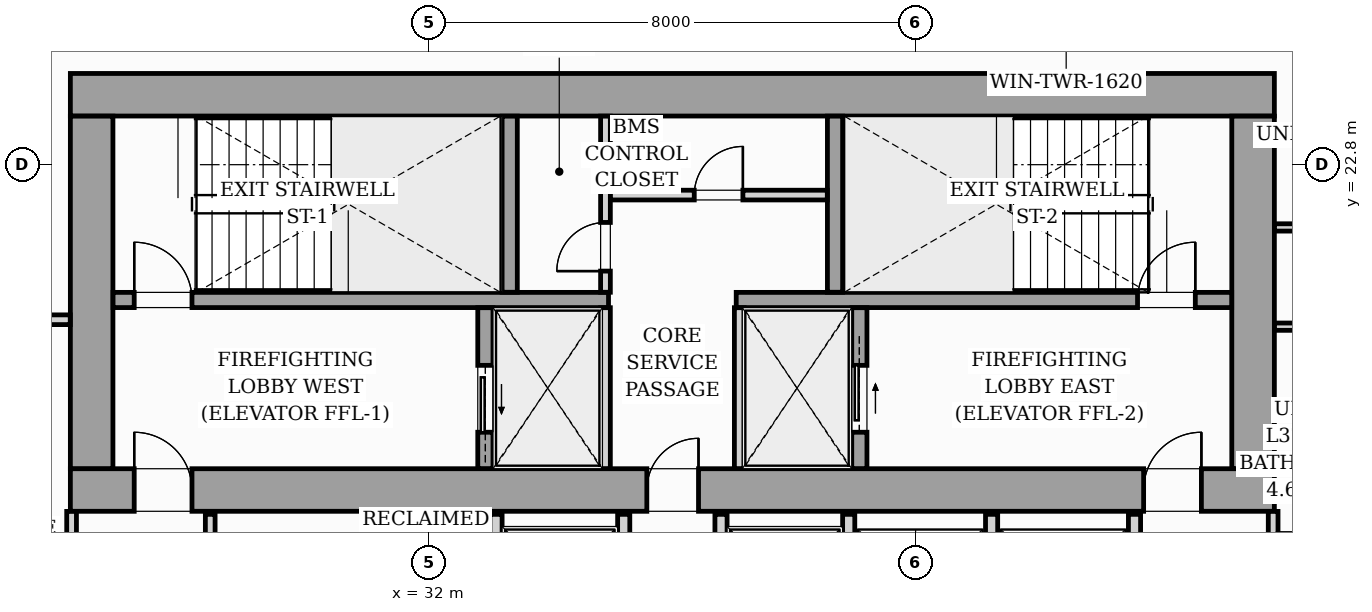
"""IFC4 building model, lengths in metres.
Left out: names, types, materials, properties, quantities, classifications, styles, units other than length and angle.
Written with IfcOpenShell. Run it as: python <this file> out.ifc"""

import sys

from ifc_helpers import new_model, si_unit, direction, frame, frame_2d, origin, origin_2d, place, context, subcontext, project, spatial, rectangle, i_section, extrude, source, transform, mapped, element, fill, save


model = new_model("IFC4")
c1 = context("Model", 3, precision=1e-05, world=origin(), true_north=direction((0.0, 1.0)))
c2 = subcontext(c1, "Body", "Model", "MODEL_VIEW")
j1 = project(units=[si_unit("LENGTHUNIT", "METRE"), si_unit("PLANEANGLEUNIT", "RADIAN")], contexts=[c1])
p1 = place(None, origin())
s1 = spatial("IfcSite", under=j1, at=p1, CompositionType="ELEMENT")
p2 = place(p1, origin())
s2 = spatial("IfcBuilding", under=s1, at=p2, CompositionType="ELEMENT")
p3 = place(p2, frame((0.0, 0.0, 131.0)))
s3 = spatial("IfcBuildingStorey", under=s2, at=p3, CompositionType="ELEMENT", Elevation=131.0)
m1 = source(origin(), c2, "Body", "SweptSolid", [
    extrude(i_section(OverallWidth=0.421, OverallDepth=0.465, WebThickness=0.045, FlangeThickness=0.073, FilletRadius=0.018, at=origin_2d()), origin(), (0.0, 0.0, 1.0), 3.196),
])
for number, where, z_axis, x_axis in (
    (1, (26.4, 17.4, 0.002), (0.0, 0.0, 1.0), (1.0, 0.0, 0.0)),
    (2, (33.12, 17.4, 0.002), (0.0, 0.0, 1.0), (1.0, 0.0, 0.0)),
    (3, (38.88, 17.4, 0.002), (0.0, 0.0, 1.0), (1.0, 0.0, 0.0)),
    (4, (45.6, 17.4, 0.002), (0.0, 0.0, 1.0), (1.0, 0.0, 0.0)),
    (5, (26.4, 24.0, 0.002), (0.0, 0.0, 1.0), (1.0, 0.0, 0.0)),
    (6, (33.12, 24.0, 0.002), (0.0, 0.0, 1.0), (1.0, 0.0, 0.0)),
    (7, (38.88, 24.0, 0.002), (0.0, 0.0, 1.0), (1.0, 0.0, 0.0)),
    (8, (45.6, 24.0, 0.002), (0.0, 0.0, 1.0), (1.0, 0.0, 0.0)),
):
    element("IfcColumn", number, at=place(p3, frame(where, z_axis=z_axis, x_axis=x_axis)), inside=s3, PredefinedType="PILASTER", context=c2, shape_type="MappedRepresentation", body=[
        mapped(m1, transform((0.0, 0.0, 0.0), scale=1.0)),
    ])
p4 = place(p3, frame((40.983, 25.727, 0.0), z_axis=(0.0, 0.0, 1.0), x_axis=(0.995395844771, -0.095849424686, 0.0)))
e9 = element("IfcWall", 9, at=p4, inside=s3, PredefinedType="STANDARD", context=c2, shape_type="SweptSolid", body=[
    extrude(rectangle(XDim=17.01, YDim=0.26, at=frame_2d((8.505, 0.0))), origin(), (0.0, 0.0, 1.0), 2.94),
])
p5 = place(p4, frame((9.18, 0.0, 0.0)))
e10 = element("IfcOpeningElement", 10, at=p5, cuts=e9, PredefinedType="OPENING", context=c2, shape_type="SweptSolid", body=[
    extrude(rectangle(XDim=1.8, YDim=2.06, at=frame_2d((0.9, 1.03))), frame((0.0, 0.14, 0.0), z_axis=(0.0, -1.0, 0.0), x_axis=(1.0, 0.0, 0.0)), (0.0, 0.0, 1.0), 0.28),
])
p6 = place(p4, frame((0.7, 0.0, 0.65)))
e11 = element("IfcOpeningElement", 11, at=p6, cuts=e9, PredefinedType="OPENING", context=c2, shape_type="SweptSolid", body=[
    extrude(rectangle(XDim=1.6, YDim=1.5, at=frame_2d((0.8, 0.75))), frame((0.0, 0.14, 0.0), z_axis=(0.0, -1.0, 0.0), x_axis=(1.0, 0.0, 0.0)), (0.0, 0.0, 1.0), 0.28),
])
p7 = place(p3, frame((26.1, 17.45, 0.0), z_axis=(0.0, 0.0, 1.0), x_axis=(1.0, 0.0, 0.0)))
e12 = element("IfcWall", 12, at=p7, inside=s3, PredefinedType="SHEAR", context=c2, shape_type="SweptSolid", body=[
    extrude(rectangle(XDim=19.8, YDim=0.7, at=frame_2d((9.9, 0.0))), origin(), (0.0, 0.0, 1.0), 3.2),
])
p8 = place(p7, frame((1.05, 0.0, 0.0)))
e13 = element("IfcOpeningElement", 13, at=p8, cuts=e12, PredefinedType="OPENING", context=c2, shape_type="SweptSolid", body=[
    extrude(rectangle(XDim=0.95, YDim=2.06, at=frame_2d((0.475, 1.03))), frame((0.0, 0.36, 0.0), z_axis=(0.0, -1.0, 0.0), x_axis=(1.0, 0.0, 0.0)), (0.0, 0.0, 1.0), 0.72),
])
p9 = place(p7, frame((9.48, 0.0, 0.0)))
e14 = element("IfcOpeningElement", 14, at=p9, cuts=e12, PredefinedType="OPENING", context=c2, shape_type="SweptSolid", body=[
    extrude(rectangle(XDim=0.85, YDim=2.0, at=frame_2d((0.425, 1.0))), frame((0.0, 0.36, 0.0), z_axis=(0.0, -1.0, 0.0), x_axis=(1.0, 0.0, 0.0)), (0.0, 0.0, 1.0), 0.72),
])
p10 = place(p7, frame((17.65, 0.0, 0.0)))
e15 = element("IfcOpeningElement", 15, at=p10, cuts=e12, PredefinedType="OPENING", context=c2, shape_type="SweptSolid", body=[
    extrude(rectangle(XDim=0.95, YDim=2.06, at=frame_2d((0.475, 1.03))), frame((0.0, 0.36, 0.0), z_axis=(0.0, -1.0, 0.0), x_axis=(1.0, 0.0, 0.0)), (0.0, 0.0, 1.0), 0.72),
])
p11 = place(p3, frame((26.1, 23.95, 0.0), z_axis=(0.0, 0.0, 1.0), x_axis=(1.0, 0.0, 0.0)))
e16 = element("IfcWall", 16, at=p11, inside=s3, PredefinedType="SHEAR", context=c2, shape_type="SweptSolid", body=[
    extrude(rectangle(XDim=19.8, YDim=0.7, at=frame_2d((9.9, 0.0))), origin(), (0.0, 0.0, 1.0), 3.2),
])
for number, where, z_axis, x_axis in (
    (17, (26.45, 17.802, 0.0), (0.0, 0.0, 1.0), (0.0, 1.0, 0.0)),
    (18, (45.55, 17.802, 0.0), (0.0, 0.0, 1.0), (0.0, 1.0, 0.0)),
):
    element("IfcWall", number, at=place(p3, frame(where, z_axis=z_axis, x_axis=x_axis)), inside=s3, PredefinedType="SHEAR", context=c2, shape_type="SweptSolid", body=[
        extrude(rectangle(XDim=5.796, YDim=0.7, at=frame_2d((2.898, 0.0))), origin(), (0.0, 0.0, 1.0), 3.2),
    ])
p12 = place(p3, frame((26.802, 20.575, 0.0), z_axis=(0.0, 0.0, 1.0), x_axis=(1.0, 0.0, 0.0)))
e19 = element("IfcWall", 19, at=p12, inside=s3, PredefinedType="SOLIDWALL", context=c2, shape_type="SweptSolid", body=[
    extrude(rectangle(XDim=8.148, YDim=0.25, at=frame_2d((4.074, 0.0))), origin(), (0.0, 0.0, 1.0), 3.2),
])
p13 = place(p12, frame((0.348, 0.0, 0.0)))
e20 = element("IfcOpeningElement", 20, at=p13, cuts=e19, PredefinedType="OPENING", context=c2, shape_type="SweptSolid", body=[
    extrude(rectangle(XDim=0.95, YDim=2.06, at=frame_2d((0.475, 1.03))), frame((0.0, 0.135, 0.0), z_axis=(0.0, -1.0, 0.0), x_axis=(1.0, 0.0, 0.0)), (0.0, 0.0, 1.0), 0.27),
])
p14 = place(p3, frame((37.05, 20.575, 0.0), z_axis=(0.0, 0.0, 1.0), x_axis=(1.0, 0.0, 0.0)))
e21 = element("IfcWall", 21, at=p14, inside=s3, PredefinedType="SOLIDWALL", context=c2, shape_type="SweptSolid", body=[
    extrude(rectangle(XDim=8.148, YDim=0.25, at=frame_2d((4.074, 0.0))), origin(), (0.0, 0.0, 1.0), 3.2),
])
p15 = place(p14, frame((6.6, 0.0, 0.0)))
e22 = element("IfcOpeningElement", 22, at=p15, cuts=e21, PredefinedType="OPENING", context=c2, shape_type="SweptSolid", body=[
    extrude(rectangle(XDim=0.95, YDim=2.06, at=frame_2d((0.475, 1.03))), frame((0.0, 0.135, 0.0), z_axis=(0.0, -1.0, 0.0), x_axis=(1.0, 0.0, 0.0)), (0.0, 0.0, 1.0), 0.27),
])
for number, where, z_axis, x_axis in (
    (23, (33.325, 20.702, 0.0), (0.0, 0.0, 1.0), (0.0, 1.0, 0.0)),
    (24, (38.675, 20.702, 0.0), (0.0, 0.0, 1.0), (0.0, 1.0, 0.0)),
):
    element("IfcWall", number, at=place(p3, frame(where, z_axis=z_axis, x_axis=x_axis)), inside=s3, PredefinedType="SOLIDWALL", context=c2, shape_type="SweptSolid", body=[
        extrude(rectangle(XDim=2.896, YDim=0.25, at=frame_2d((1.448, 0.0))), origin(), (0.0, 0.0, 1.0), 3.2),
    ])
p16 = place(p3, frame((32.925, 17.802, 0.0), z_axis=(0.0, 0.0, 1.0), x_axis=(0.0, 1.0, 0.0)))
e25 = element("IfcWall", 25, at=p16, inside=s3, PredefinedType="SOLIDWALL", context=c2, shape_type="SweptSolid", body=[
    extrude(rectangle(XDim=2.646, YDim=0.25, at=frame_2d((1.323, 0.0))), origin(), (0.0, 0.0, 1.0), 3.2),
])
p17 = place(p16, frame((0.598, 0.0, 0.0)))
e26 = element("IfcOpeningElement", 26, at=p17, cuts=e25, PredefinedType="OPENING", context=c2, shape_type="SweptSolid", body=[
    extrude(rectangle(XDim=1.1, YDim=2.08, at=frame_2d((0.55, 1.04))), frame((0.0, 0.135, 0.0), z_axis=(0.0, -1.0, 0.0), x_axis=(1.0, 0.0, 0.0)), (0.0, 0.0, 1.0), 0.27),
])
for number, where, z_axis, x_axis in (
    (27, (34.9, 17.802, 0.0), (0.0, 0.0, 1.0), (0.0, 1.0, 0.0)),
    (28, (37.1, 17.802, 0.0), (0.0, 0.0, 1.0), (0.0, 1.0, 0.0)),
):
    element("IfcWall", number, at=place(p3, frame(where, z_axis=z_axis, x_axis=x_axis)), inside=s3, PredefinedType="PARTITIONING", context=c2, shape_type="SweptSolid", body=[
        extrude(rectangle(XDim=2.646, YDim=0.16, at=frame_2d((1.323, 0.0))), origin(), (0.0, 0.0, 1.0), 2.94),
    ])
p18 = place(p3, frame((39.075, 17.802, 0.0), z_axis=(0.0, 0.0, 1.0), x_axis=(0.0, 1.0, 0.0)))
e29 = element("IfcWall", 29, at=p18, inside=s3, PredefinedType="SOLIDWALL", context=c2, shape_type="SweptSolid", body=[
    extrude(rectangle(XDim=2.646, YDim=0.25, at=frame_2d((1.323, 0.0))), origin(), (0.0, 0.0, 1.0), 3.2),
])
p19 = place(p18, frame((0.598, 0.0, 0.0)))
e30 = element("IfcOpeningElement", 30, at=p19, cuts=e29, PredefinedType="OPENING", context=c2, shape_type="SweptSolid", body=[
    extrude(rectangle(XDim=1.1, YDim=2.08, at=frame_2d((0.55, 1.04))), frame((0.0, 0.135, 0.0), z_axis=(0.0, -1.0, 0.0), x_axis=(1.0, 0.0, 0.0)), (0.0, 0.0, 1.0), 0.27),
])
p20 = place(p3, frame((34.9, 20.702, 0.0), z_axis=(0.0, 0.0, 1.0), x_axis=(0.0, 1.0, 0.0)))
e31 = element("IfcWall", 31, at=p20, inside=s3, PredefinedType="PARTITIONING", context=c2, shape_type="SweptSolid", body=[
    extrude(rectangle(XDim=2.896, YDim=0.16, at=frame_2d((1.448, 0.0))), origin(), (0.0, 0.0, 1.0), 2.94),
])
p21 = place(p20, frame((0.348, 0.0, 0.0)))
e32 = element("IfcOpeningElement", 32, at=p21, cuts=e31, PredefinedType="OPENING", context=c2, shape_type="SweptSolid", body=[
    extrude(rectangle(XDim=0.8, YDim=2.05, at=frame_2d((0.4, 1.025))), frame((0.0, 0.09, 0.0), z_axis=(0.0, -1.0, 0.0), x_axis=(1.0, 0.0, 0.0)), (0.0, 0.0, 1.0), 0.18),
])
p22 = place(p3, frame((34.982, 22.3, 0.0), z_axis=(0.0, 0.0, 1.0), x_axis=(1.0, 0.0, 0.0)))
e33 = element("IfcWall", 33, at=p22, inside=s3, PredefinedType="PARTITIONING", context=c2, shape_type="SweptSolid", body=[
    extrude(rectangle(XDim=3.566, YDim=0.16, at=frame_2d((1.783, 0.0))), origin(), (0.0, 0.0, 1.0), 2.94),
])
p23 = place(p22, frame((1.378, 0.0, 0.0)))
e34 = element("IfcOpeningElement", 34, at=p23, cuts=e33, PredefinedType="OPENING", context=c2, shape_type="SweptSolid", body=[
    extrude(rectangle(XDim=0.8, YDim=2.05, at=frame_2d((0.4, 1.025))), frame((0.0, 0.09, 0.0), z_axis=(0.0, -1.0, 0.0), x_axis=(1.0, 0.0, 0.0)), (0.0, 0.0, 1.0), 0.18),
])
p24 = place(p3, frame((28.4, 14.75, 0.0), z_axis=(0.0, 0.0, 1.0), x_axis=(0.0, 1.0, 0.0)))
e35 = element("IfcWall", 35, at=p24, inside=s3, PredefinedType="PARTITIONING", context=c2, shape_type="SweptSolid", body=[
    extrude(rectangle(XDim=2.3, YDim=0.16, at=frame_2d((1.15, 0.0))), origin(), (0.0, 0.0, 1.0), 2.94),
])
for number, where, z_axis, x_axis in (
    (36, (33.1, 14.75, 0.0), (0.0, 0.0, 1.0), (0.0, 1.0, 0.0)),
    (37, (35.2, 14.75, 0.0), (0.0, 0.0, 1.0), (0.0, 1.0, 0.0)),
    (38, (36.8, 14.75, 0.0), (0.0, 0.0, 1.0), (0.0, 1.0, 0.0)),
    (39, (38.9, 14.75, 0.0), (0.0, 0.0, 1.0), (0.0, 1.0, 0.0)),
    (40, (41.25, 14.75, 0.0), (0.0, 0.0, 1.0), (0.0, 1.0, 0.0)),
    (41, (43.6, 14.75, 0.0), (0.0, 0.0, 1.0), (0.0, 1.0, 0.0)),
):
    element("IfcWall", number, at=place(p3, frame(where, z_axis=z_axis, x_axis=x_axis)), inside=s3, PredefinedType="PARTITIONING", context=c2, shape_type="SweptSolid", body=[
        extrude(rectangle(XDim=2.3, YDim=0.2, at=frame_2d((1.15, 0.0))), origin(), (0.0, 0.0, 1.0), 2.94),
    ])
p25 = place(p3, frame((45.88, 12.732, 0.0), z_axis=(0.0, 0.0, 1.0), x_axis=(0.0, 1.0, 0.0)))
e42 = element("IfcWall", 42, at=p25, inside=s3, PredefinedType="PARTITIONING", context=c2, shape_type="SweptSolid", body=[
    extrude(rectangle(XDim=4.366, YDim=0.16, at=frame_2d((2.183, 0.0))), origin(), (0.0, 0.0, 1.0), 2.94),
])
p26 = place(p25, frame((0.493, 0.0, 0.0)))
e43 = element("IfcOpeningElement", 43, at=p26, cuts=e42, PredefinedType="OPENING", context=c2, shape_type="SweptSolid", body=[
    extrude(rectangle(XDim=0.95, YDim=2.06, at=frame_2d((0.475, 1.03))), frame((0.0, 0.09, 0.0), z_axis=(0.0, -1.0, 0.0), x_axis=(1.0, 0.0, 0.0)), (0.0, 0.0, 1.0), 0.18),
])
p27 = place(p3, frame((45.902, 18.85, 0.0), z_axis=(0.0, 0.0, 1.0), x_axis=(1.0, 0.0, 0.0)))
e44 = element("IfcWall", 44, at=p27, inside=s3, PredefinedType="PARTITIONING", context=c2, shape_type="SweptSolid", body=[
    extrude(rectangle(XDim=2.316, YDim=0.12, at=frame_2d((1.158, 0.0))), origin(), (0.0, 0.0, 1.0), 2.94),
])
p28 = place(p3, frame((45.902, 21.768, 0.0), z_axis=(0.0, 0.0, 1.0), x_axis=(1.0, 0.0, 0.0)))
e45 = element("IfcWall", 45, at=p28, inside=s3, PredefinedType="PARTITIONING", context=c2, shape_type="SweptSolid", body=[
    extrude(rectangle(XDim=12.781, YDim=0.12, at=frame_2d((6.391, 0.0))), origin(), (0.0, 0.0, 1.0), 2.94),
])
p29 = place(p28, frame((6.146, 0.0, 0.0)))
e46 = element("IfcOpeningElement", 46, at=p29, cuts=e45, PredefinedType="OPENING", context=c2, shape_type="SweptSolid", body=[
    extrude(rectangle(XDim=0.85, YDim=2.05, at=frame_2d((0.425, 1.025))), frame((0.0, 0.07, 0.0), z_axis=(0.0, -1.0, 0.0), x_axis=(1.0, 0.0, 0.0)), (0.0, 0.0, 1.0), 0.14),
])
p30 = place(p3, frame((45.902, 20.136, 0.0), z_axis=(0.0, 0.0, 1.0), x_axis=(1.0, 0.0, 0.0)))
e47 = element("IfcWall", 47, at=p30, inside=s3, PredefinedType="PARTITIONING", context=c2, shape_type="SweptSolid", body=[
    extrude(rectangle(XDim=14.063, YDim=0.12, at=frame_2d((7.031, 0.0))), origin(), (0.0, 0.0, 1.0), 2.94),
])
p31 = place(p30, frame((6.708, 0.0, 0.0)))
e48 = element("IfcOpeningElement", 48, at=p31, cuts=e47, PredefinedType="OPENING", context=c2, shape_type="SweptSolid", body=[
    extrude(rectangle(XDim=0.85, YDim=2.05, at=frame_2d((0.425, 1.025))), frame((0.0, 0.07, 0.0), z_axis=(0.0, -1.0, 0.0), x_axis=(1.0, 0.0, 0.0)), (0.0, 0.0, 1.0), 0.14),
])
p32 = place(p3, frame((24.182, 20.25, 0.0), z_axis=(0.0, 0.0, 1.0), x_axis=(1.0, 0.0, 0.0)))
e49 = element("IfcWall", 49, at=p32, inside=s3, PredefinedType="PARTITIONING", context=c2, shape_type="SweptSolid", body=[
    extrude(rectangle(XDim=1.916, YDim=0.16, at=frame_2d((0.958, 0.0))), origin(), (0.0, 0.0, 1.0), 2.94),
])
p33 = place(p3, frame((26.12, 14.66, 0.0), z_axis=(0.0, 0.0, 1.0), x_axis=(0.0, 1.0, 0.0)))
e50 = element("IfcWall", 50, at=p33, inside=s3, PredefinedType="PARTITIONING", context=c2, shape_type="SweptSolid", body=[
    extrude(rectangle(XDim=2.438, YDim=0.16, at=frame_2d((1.219, 0.0))), origin(), (0.0, 0.0, 1.0), 2.94),
])
m2 = source(origin(), c2, "Body", "SweptSolid", [
    extrude(rectangle(XDim=0.95, YDim=2.06, at=frame_2d((0.475, 1.03))), frame((0.0, 0.025, 0.0), z_axis=(0.0, -1.0, 0.0), x_axis=(1.0, 0.0, 0.0)), (0.0, 0.0, 1.0), 0.05),
])
p34 = place(p8, origin())
e51 = element("IfcDoor", 51, at=p34, inside=s3, OperationType="SINGLE_SWING_LEFT", PredefinedType="DOOR", context=c2, shape_type="MappedRepresentation", body=[
    mapped(m2, transform((0.0, 0.0, 0.0), scale=1.0)),
])
fill(e13, e51)
m3 = source(origin(), c2, "Body", "SweptSolid", [
    extrude(rectangle(XDim=0.85, YDim=2.0, at=frame_2d((0.425, 1.0))), frame((0.0, 0.025, 0.0), z_axis=(0.0, -1.0, 0.0), x_axis=(1.0, 0.0, 0.0)), (0.0, 0.0, 1.0), 0.05),
])
p35 = place(p9, origin())
e52 = element("IfcDoor", 52, at=p35, inside=s3, OperationType="SINGLE_SWING_RIGHT", PredefinedType="DOOR", context=c2, shape_type="MappedRepresentation", body=[
    mapped(m3, transform((0.0, 0.0, 0.0), scale=1.0)),
])
fill(e14, e52)
p36 = place(p10, origin())
e53 = element("IfcDoor", 53, at=p36, inside=s3, OperationType="SINGLE_SWING_RIGHT", PredefinedType="DOOR", context=c2, shape_type="MappedRepresentation", body=[
    mapped(m2, transform((0.0, 0.0, 0.0), scale=1.0)),
])
fill(e15, e53)
p37 = place(p13, origin())
e54 = element("IfcDoor", 54, at=p37, inside=s3, OperationType="SINGLE_SWING_LEFT", PredefinedType="DOOR", context=c2, shape_type="MappedRepresentation", body=[
    mapped(m2, transform((0.0, 0.0, 0.0), scale=1.0)),
])
fill(e20, e54)
p38 = place(p15, origin())
e55 = element("IfcDoor", 55, at=p38, inside=s3, OperationType="SINGLE_SWING_RIGHT", PredefinedType="DOOR", context=c2, shape_type="MappedRepresentation", body=[
    mapped(m2, transform((0.0, 0.0, 0.0), scale=1.0)),
])
fill(e22, e55)
m4 = source(origin(), c2, "Body", "SweptSolid", [
    extrude(rectangle(XDim=1.1, YDim=2.08, at=frame_2d((0.55, 1.04))), frame((0.0, 0.025, 0.0), z_axis=(0.0, -1.0, 0.0), x_axis=(1.0, 0.0, 0.0)), (0.0, 0.0, 1.0), 0.05),
])
p39 = place(p17, origin())
e56 = element("IfcDoor", 56, at=p39, inside=s3, OperationType="SLIDING_TO_LEFT", PredefinedType="DOOR", context=c2, shape_type="MappedRepresentation", body=[
    mapped(m4, transform((0.0, 0.0, 0.0), scale=1.0)),
])
fill(e26, e56)
p40 = place(p19, origin())
e57 = element("IfcDoor", 57, at=p40, inside=s3, OperationType="SLIDING_TO_RIGHT", PredefinedType="DOOR", context=c2, shape_type="MappedRepresentation", body=[
    mapped(m4, transform((0.0, 0.0, 0.0), scale=1.0)),
])
fill(e30, e57)
m5 = source(origin(), c2, "Body", "SweptSolid", [
    extrude(rectangle(XDim=0.8, YDim=2.05, at=frame_2d((0.4, 1.025))), frame((0.0, 0.025, 0.0), z_axis=(0.0, -1.0, 0.0), x_axis=(1.0, 0.0, 0.0)), (0.0, 0.0, 1.0), 0.05),
])
p41 = place(p21, origin())
e58 = element("IfcDoor", 58, at=p41, inside=s3, OperationType="SINGLE_SWING_LEFT", PredefinedType="DOOR", context=c2, shape_type="MappedRepresentation", body=[
    mapped(m5, transform((0.0, 0.0, 0.0), scale=1.0)),
])
fill(e32, e58)
p42 = place(p23, origin())
e59 = element("IfcDoor", 59, at=p42, inside=s3, OperationType="SINGLE_SWING_RIGHT", PredefinedType="DOOR", context=c2, shape_type="MappedRepresentation", body=[
    mapped(m5, transform((0.0, 0.0, 0.0), scale=1.0)),
])
fill(e34, e59)
save(model, sys.argv[1])
